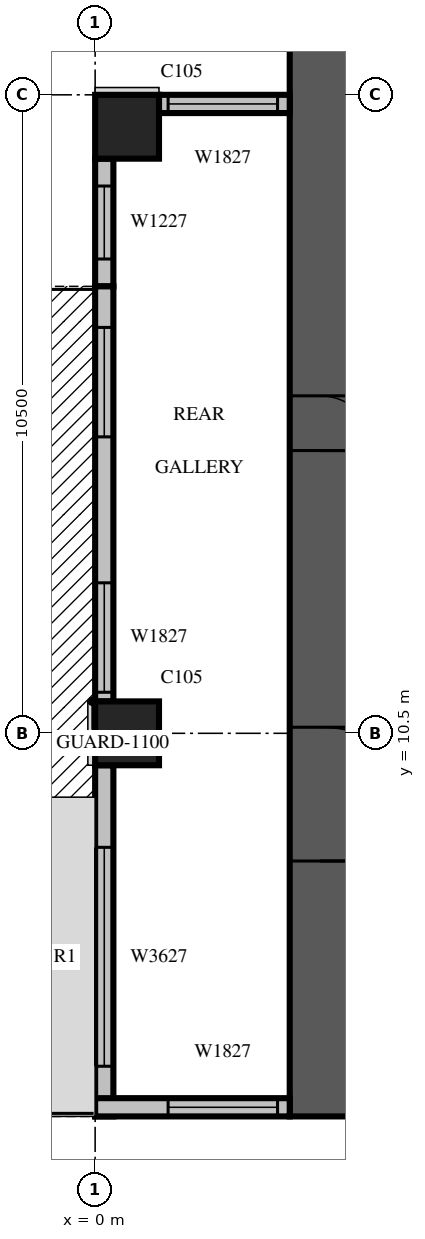
"""IFC4 building model, lengths in metres.
Left out: names, types, materials, properties, quantities, classifications, styles, units other than length and angle.
Written with IfcOpenShell. Run it as: python <this file> out.ifc"""

import sys

from ifc_helpers import new_model, si_unit, direction, frame, frame_2d, origin, origin_2d, place, context, subcontext, project, spatial, rectangle, extrude, source, transform, mapped, element, fill, save


model = new_model("IFC4")
c1 = context("Model", 3, precision=1e-05, world=origin(), true_north=direction((0.0, 1.0)))
c2 = subcontext(c1, "Body", "Model", "MODEL_VIEW")
j1 = project(units=[si_unit("LENGTHUNIT", "METRE"), si_unit("PLANEANGLEUNIT", "RADIAN")], contexts=[c1])
p1 = place(None, origin())
s1 = spatial("IfcSite", under=j1, at=p1, CompositionType="ELEMENT")
p2 = place(p1, origin())
s2 = spatial("IfcBuilding", under=s1, at=p2, CompositionType="ELEMENT")
p3 = place(p2, frame((0.0, 0.0, 111.9)))
s3 = spatial("IfcBuildingStorey", under=s2, at=p3, CompositionType="ELEMENT", Elevation=111.9)
m1 = source(origin(), c2, "Body", "SweptSolid", [
    extrude(rectangle(XDim=1.05, YDim=1.05, at=origin_2d()), origin(), (0.0, 0.0, 1.0), 4.2),
])
for number, where, z_axis, x_axis in (
    (1, (0.525, 10.5, 0.0), (0.0, 0.0, 1.0), (1.0, 0.0, 0.0)),
    (2, (0.525, 20.475, 0.0), (0.0, 0.0, 1.0), (1.0, 0.0, 0.0)),
):
    element("IfcColumn", number, at=place(p3, frame(where, z_axis=z_axis, x_axis=x_axis)), inside=s3, PredefinedType="COLUMN", context=c2, shape_type="MappedRepresentation", body=[
        mapped(m1, transform((0.0, 0.0, 0.0), scale=1.0)),
    ])
m2 = source(origin(), c2, "Body", "SweptSolid", [
    extrude(rectangle(XDim=17.8, YDim=1.0, at=frame_2d((8.9, 0.0))), origin(), (0.0, 0.0, 1.0), 4.2),
])
p4 = place(p3, frame((3.7, 4.2, 0.0), z_axis=(0.0, 0.0, 1.0), x_axis=(0.0, 1.0, 0.0)))
e3 = element("IfcWall", 3, at=p4, inside=s3, PredefinedType="SHEAR", context=c2, shape_type="MappedRepresentation", body=[
    mapped(m2, transform((0.0, 0.0, 0.0), scale=1.0)),
])
m3 = source(origin(), c2, "Body", "SweptSolid", [
    extrude(rectangle(XDim=2.2, YDim=2.1, at=frame_2d((1.1, 1.05))), frame((0.0, 0.51, 0.0), z_axis=(0.0, -1.0, 0.0), x_axis=(1.0, 0.0, 0.0)), (0.0, 0.0, 1.0), 1.02),
])
p5 = place(p4, frame((4.2, 0.0, 0.0)))
e4 = element("IfcOpeningElement", 4, at=p5, cuts=e3, PredefinedType="OPENING", context=c2, shape_type="MappedRepresentation", body=[
    mapped(m3, transform((0.0, 0.0, 0.0), scale=1.0)),
])
m4 = source(origin(), c2, "Body", "SweptSolid", [
    extrude(rectangle(XDim=0.9, YDim=2.1, at=frame_2d((0.45, 1.05))), frame((0.0, 0.51, 0.0), z_axis=(0.0, -1.0, 0.0), x_axis=(1.0, 0.0, 0.0)), (0.0, 0.0, 1.0), 1.02),
])
p6 = place(p4, frame((10.95, 0.0, 0.0)))
e5 = element("IfcOpeningElement", 5, at=p6, cuts=e3, PredefinedType="OPENING", context=c2, shape_type="MappedRepresentation", body=[
    mapped(m4, transform((0.0, 0.0, 0.0), scale=1.0)),
])
m5 = source(origin(), c2, "Body", "SweptSolid", [
    extrude(rectangle(XDim=2.15, YDim=0.3, at=frame_2d((1.075, 0.0))), origin(), (0.0, 0.0, 1.0), 3.8),
])
p7 = place(p3, frame((3.2, 20.85, 0.0), z_axis=(0.0, 0.0, 1.0), x_axis=(-1.0, 0.0, 0.0)))
e6 = element("IfcWall", 6, at=p7, inside=s3, PredefinedType="STANDARD", context=c2, shape_type="MappedRepresentation", body=[
    mapped(m5, transform((0.0, 0.0, 0.0), scale=1.0)),
])
m6 = source(origin(), c2, "Body", "SweptSolid", [
    extrude(rectangle(XDim=1.8, YDim=2.7, at=frame_2d((0.9, 1.35))), frame((0.0, 0.16, 0.0), z_axis=(0.0, -1.0, 0.0), x_axis=(1.0, 0.0, 0.0)), (0.0, 0.0, 1.0), 0.32),
])
p8 = place(p7, frame((0.2, 0.0, 0.6)))
e7 = element("IfcOpeningElement", 7, at=p8, cuts=e6, PredefinedType="OPENING", context=c2, shape_type="MappedRepresentation", body=[
    mapped(m6, transform((0.0, 0.0, 0.0), scale=1.0)),
])
m7 = source(origin(), c2, "Body", "SweptSolid", [
    extrude(rectangle(XDim=2.1, YDim=0.3, at=frame_2d((1.05, 0.0))), origin(), (0.0, 0.0, 1.0), 3.8),
])
p9 = place(p3, frame((0.15, 19.95, 0.0), z_axis=(0.0, 0.0, 1.0), x_axis=(0.0, -1.0, 0.0)))
e8 = element("IfcWall", 8, at=p9, inside=s3, PredefinedType="STANDARD", context=c2, shape_type="MappedRepresentation", body=[
    mapped(m7, transform((0.0, 0.0, 0.0), scale=1.0)),
])
m8 = source(origin(), c2, "Body", "SweptSolid", [
    extrude(rectangle(XDim=1.2, YDim=2.7, at=frame_2d((0.6, 1.35))), frame((0.0, 0.16, 0.0), z_axis=(0.0, -1.0, 0.0), x_axis=(1.0, 0.0, 0.0)), (0.0, 0.0, 1.0), 0.32),
])
p10 = place(p9, frame((0.45, 0.0, 0.6)))
e9 = element("IfcOpeningElement", 9, at=p10, cuts=e8, PredefinedType="OPENING", context=c2, shape_type="MappedRepresentation", body=[
    mapped(m8, transform((0.0, 0.0, 0.0), scale=1.0)),
])
m9 = source(origin(), c2, "Body", "SweptSolid", [
    extrude(rectangle(XDim=6.825, YDim=0.3, at=frame_2d((3.413, 0.0))), origin(), (0.0, 0.0, 1.0), 3.8),
])
p11 = place(p3, frame((0.15, 17.85, 0.0), z_axis=(0.0, 0.0, 1.0), x_axis=(0.0, -1.0, 0.0)))
e10 = element("IfcWall", 10, at=p11, inside=s3, PredefinedType="STANDARD", context=c2, shape_type="MappedRepresentation", body=[
    mapped(m9, transform((0.0, 0.0, 0.0), scale=1.0)),
])
m10 = source(origin(), c2, "Body", "SweptSolid", [
    extrude(rectangle(XDim=1.8, YDim=2.4, at=frame_2d((0.9, 1.2))), frame((0.0, 0.16, 0.0), z_axis=(0.0, -1.0, 0.0), x_axis=(1.0, 0.0, 0.0)), (0.0, 0.0, 1.0), 0.32),
])
p12 = place(p11, frame((0.675, 0.0, 0.0)))
e11 = element("IfcOpeningElement", 11, at=p12, cuts=e10, PredefinedType="OPENING", context=c2, shape_type="MappedRepresentation", body=[
    mapped(m10, transform((0.0, 0.0, 0.0), scale=1.0)),
])
p13 = place(p11, frame((4.875, 0.0, 0.6)))
e12 = element("IfcOpeningElement", 12, at=p13, cuts=e10, PredefinedType="OPENING", context=c2, shape_type="MappedRepresentation", body=[
    mapped(m6, transform((0.0, 0.0, 0.0), scale=1.0)),
])
m11 = source(origin(), c2, "Body", "SweptSolid", [
    extrude(rectangle(XDim=5.775, YDim=0.3, at=frame_2d((2.888, 0.0))), origin(), (0.0, 0.0, 1.0), 3.8),
])
p14 = place(p3, frame((0.15, 9.975, 0.0), z_axis=(0.0, 0.0, 1.0), x_axis=(0.0, -1.0, 0.0)))
e13 = element("IfcWall", 13, at=p14, inside=s3, PredefinedType="STANDARD", context=c2, shape_type="MappedRepresentation", body=[
    mapped(m11, transform((0.0, 0.0, 0.0), scale=1.0)),
])
m12 = source(origin(), c2, "Body", "SweptSolid", [
    extrude(rectangle(XDim=3.6, YDim=2.7, at=frame_2d((1.8, 1.35))), frame((0.0, 0.16, 0.0), z_axis=(0.0, -1.0, 0.0), x_axis=(1.0, 0.0, 0.0)), (0.0, 0.0, 1.0), 0.32),
])
p15 = place(p14, frame((1.35, 0.0, 0.6)))
e14 = element("IfcOpeningElement", 14, at=p15, cuts=e13, PredefinedType="OPENING", context=c2, shape_type="MappedRepresentation", body=[
    mapped(m12, transform((0.0, 0.0, 0.0), scale=1.0)),
])
m13 = source(origin(), c2, "Body", "SweptSolid", [
    extrude(rectangle(XDim=3.2, YDim=0.3, at=frame_2d((1.6, 0.0))), origin(), (0.0, 0.0, 1.0), 3.8),
])
p16 = place(p3, frame((0.0, 4.35, 0.0), z_axis=(0.0, 0.0, 1.0), x_axis=(1.0, 0.0, 0.0)))
e15 = element("IfcWall", 15, at=p16, inside=s3, PredefinedType="STANDARD", context=c2, shape_type="MappedRepresentation", body=[
    mapped(m13, transform((0.0, 0.0, 0.0), scale=1.0)),
])
p17 = place(p16, frame((1.2, 0.0, 0.6)))
e16 = element("IfcOpeningElement", 16, at=p17, cuts=e15, PredefinedType="OPENING", context=c2, shape_type="MappedRepresentation", body=[
    mapped(m6, transform((0.0, 0.0, 0.0), scale=1.0)),
])
m14 = source(origin(), c2, "Body", "SweptSolid", [
    extrude(rectangle(XDim=1.8, YDim=2.7, at=frame_2d((0.9, 1.35))), frame((0.0, 0.03, 0.0), z_axis=(0.0, -1.0, 0.0), x_axis=(1.0, 0.0, 0.0)), (0.0, 0.0, 1.0), 0.06),
])
p18 = place(p8, origin())
e17 = element("IfcWindow", 17, at=p18, inside=s3, PartitioningType="SINGLE_PANEL", PredefinedType="WINDOW", context=c2, shape_type="MappedRepresentation", body=[
    mapped(m14, transform((0.0, 0.0, 0.0), scale=1.0)),
])
fill(e7, e17)
m15 = source(origin(), c2, "Body", "SweptSolid", [
    extrude(rectangle(XDim=1.2, YDim=2.7, at=frame_2d((0.6, 1.35))), frame((0.0, 0.03, 0.0), z_axis=(0.0, -1.0, 0.0), x_axis=(1.0, 0.0, 0.0)), (0.0, 0.0, 1.0), 0.06),
])
p19 = place(p10, origin())
e18 = element("IfcWindow", 18, at=p19, inside=s3, PartitioningType="SINGLE_PANEL", PredefinedType="WINDOW", context=c2, shape_type="MappedRepresentation", body=[
    mapped(m15, transform((0.0, 0.0, 0.0), scale=1.0)),
])
fill(e9, e18)
m16 = source(origin(), c2, "Body", "SweptSolid", [
    extrude(rectangle(XDim=1.8, YDim=2.4, at=frame_2d((0.9, 1.2))), frame((0.0, 0.025, 0.0), z_axis=(0.0, -1.0, 0.0), x_axis=(1.0, 0.0, 0.0)), (0.0, 0.0, 1.0), 0.05),
])
p20 = place(p12, origin())
e19 = element("IfcDoor", 19, at=p20, inside=s3, OperationType="SLIDING_TO_LEFT", PredefinedType="DOOR", context=c2, shape_type="MappedRepresentation", body=[
    mapped(m16, transform((0.0, 0.0, 0.0), scale=1.0)),
])
fill(e11, e19)
p21 = place(p13, origin())
e20 = element("IfcWindow", 20, at=p21, inside=s3, PartitioningType="SINGLE_PANEL", PredefinedType="WINDOW", context=c2, shape_type="MappedRepresentation", body=[
    mapped(m14, transform((0.0, 0.0, 0.0), scale=1.0)),
])
fill(e12, e20)
m17 = source(origin(), c2, "Body", "SweptSolid", [
    extrude(rectangle(XDim=3.6, YDim=2.7, at=frame_2d((1.8, 1.35))), frame((0.0, 0.03, 0.0), z_axis=(0.0, -1.0, 0.0), x_axis=(1.0, 0.0, 0.0)), (0.0, 0.0, 1.0), 0.06),
])
p22 = place(p15, origin())
e21 = element("IfcWindow", 21, at=p22, inside=s3, PartitioningType="SINGLE_PANEL", PredefinedType="WINDOW", context=c2, shape_type="MappedRepresentation", body=[
    mapped(m17, transform((0.0, 0.0, 0.0), scale=1.0)),
])
fill(e14, e21)
p23 = place(p17, origin())
e22 = element("IfcWindow", 22, at=p23, inside=s3, PartitioningType="SINGLE_PANEL", PredefinedType="WINDOW", context=c2, shape_type="MappedRepresentation", body=[
    mapped(m14, transform((0.0, 0.0, 0.0), scale=1.0)),
])
fill(e16, e22)
m18 = source(origin(), c2, "Body", "SweptSolid", [
    extrude(rectangle(XDim=2.2, YDim=2.1, at=frame_2d((1.1, 1.05))), frame((0.0, 0.025, 0.0), z_axis=(0.0, -1.0, 0.0), x_axis=(1.0, 0.0, 0.0)), (0.0, 0.0, 1.0), 0.05),
])
p24 = place(p5, origin())
e23 = element("IfcDoor", 23, at=p24, inside=s3, OperationType="DOUBLE_DOOR_SINGLE_SWING", PredefinedType="DOOR", context=c2, shape_type="MappedRepresentation", body=[
    mapped(m18, transform((0.0, 0.0, 0.0), scale=1.0)),
])
fill(e4, e23)
m19 = source(origin(), c2, "Body", "SweptSolid", [
    extrude(rectangle(XDim=0.9, YDim=2.1, at=frame_2d((0.45, 1.05))), frame((0.0, 0.025, 0.0), z_axis=(0.0, -1.0, 0.0), x_axis=(1.0, 0.0, 0.0)), (0.0, 0.0, 1.0), 0.05),
])
p25 = place(p6, origin())
e24 = element("IfcDoor", 24, at=p25, inside=s3, OperationType="SINGLE_SWING_RIGHT", PredefinedType="DOOR", context=c2, shape_type="MappedRepresentation", body=[
    mapped(m19, transform((0.0, 0.0, 0.0), scale=1.0)),
])
fill(e5, e24)
save(model, sys.argv[1])
